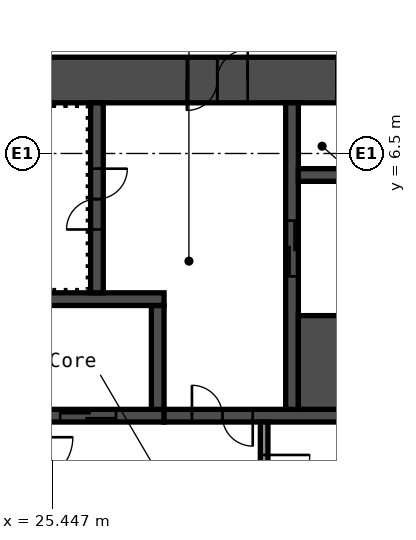
"""IFC4 building model, lengths in metres.
Left out: names, types, materials, properties, quantities, classifications, styles, units other than length and angle.
Written with IfcOpenShell. Run it as: python <this file> out.ifc"""

import sys

from ifc_helpers import new_model, si_unit, direction, frame, frame_2d, origin, place, context, subcontext, project, spatial, rectangle, extrude, element, fill, save


model = new_model("IFC4")
c1 = context("Model", 3, precision=1e-05, world=origin(), true_north=direction((0.0, 1.0)))
c2 = subcontext(c1, "Body", "Model", "MODEL_VIEW")
j1 = project(units=[si_unit("LENGTHUNIT", "METRE"), si_unit("PLANEANGLEUNIT", "RADIAN")], contexts=[c1])
p1 = place(None, origin())
s1 = spatial("IfcSite", under=j1, at=p1, CompositionType="ELEMENT")
p2 = place(p1, origin())
s2 = spatial("IfcBuilding", under=s1, at=p2, CompositionType="ELEMENT")
p3 = place(p2, frame((0.0, 0.0, 69.0)))
s3 = spatial("IfcBuildingStorey", under=s2, at=p3, CompositionType="ELEMENT", Elevation=69.0)
p4 = place(p3, frame((17.7, 7.95, 0.0), z_axis=(0.0, 0.0, 1.0), x_axis=(1.0, 0.0, 0.0)))
e1 = element("IfcWall", 1, at=p4, inside=s3, PredefinedType="SHEAR", context=c2, shape_type="SweptSolid", body=[
    extrude(rectangle(XDim=15.0, YDim=0.9, at=frame_2d((7.5, 0.0))), origin(), (0.0, 0.0, 1.0), 6.0),
])
p5 = place(p4, frame((10.4, 0.0, 0.0)))
e2 = element("IfcOpeningElement", 2, at=p5, cuts=e1, PredefinedType="OPENING", context=c2, shape_type="SweptSolid", body=[
    extrude(rectangle(XDim=1.2, YDim=2.1, at=frame_2d((0.6, 1.05))), frame((0.0, 0.46, 0.0), z_axis=(0.0, -1.0, 0.0), x_axis=(1.0, 0.0, 0.0)), (0.0, 0.0, 1.0), 0.92),
])
p6 = place(p4, frame((13.35, 0.0, 0.0)))
e3 = element("IfcOpeningElement", 3, at=p6, cuts=e1, PredefinedType="OPENING", context=c2, shape_type="SweptSolid", body=[
    extrude(rectangle(XDim=0.9, YDim=2.1, at=frame_2d((0.45, 1.05))), frame((0.0, 0.46, 0.0), z_axis=(0.0, -1.0, 0.0), x_axis=(1.0, 0.0, 0.0)), (0.0, 0.0, 1.0), 0.92),
])
p7 = place(p3, frame((20.15, 1.325, 0.0), z_axis=(0.0, 0.0, 1.0), x_axis=(1.0, 0.0, 0.0)))
e4 = element("IfcWall", 4, at=p7, inside=s3, PredefinedType="SHEAR", context=c2, shape_type="SweptSolid", body=[
    extrude(rectangle(XDim=7.5, YDim=0.25, at=frame_2d((3.75, 0.0))), origin(), (0.0, 0.0, 1.0), 6.0),
])
p8 = place(p7, frame((0.65, 0.0, 0.0)))
e5 = element("IfcOpeningElement", 5, at=p8, cuts=e4, PredefinedType="OPENING", context=c2, shape_type="SweptSolid", body=[
    extrude(rectangle(XDim=1.1, YDim=2.1, at=frame_2d((0.55, 1.05))), frame((0.0, 0.135, 0.0), z_axis=(0.0, -1.0, 0.0), x_axis=(1.0, 0.0, 0.0)), (0.0, 0.0, 1.0), 0.27),
])
p9 = place(p7, frame((3.05, 0.0, 0.0)))
e6 = element("IfcOpeningElement", 6, at=p9, cuts=e4, PredefinedType="OPENING", context=c2, shape_type="SweptSolid", body=[
    extrude(rectangle(XDim=1.1, YDim=2.1, at=frame_2d((0.55, 1.05))), frame((0.0, 0.135, 0.0), z_axis=(0.0, -1.0, 0.0), x_axis=(1.0, 0.0, 0.0)), (0.0, 0.0, 1.0), 0.27),
])
p10 = place(p7, frame((5.45, 0.0, 0.0)))
e7 = element("IfcOpeningElement", 7, at=p10, cuts=e4, PredefinedType="OPENING", context=c2, shape_type="SweptSolid", body=[
    extrude(rectangle(XDim=1.1, YDim=2.1, at=frame_2d((0.55, 1.05))), frame((0.0, 0.135, 0.0), z_axis=(0.0, -1.0, 0.0), x_axis=(1.0, 0.0, 0.0)), (0.0, 0.0, 1.0), 0.27),
])
p11 = place(p3, frame((27.525, 1.45, 0.0), z_axis=(0.0, 0.0, 1.0), x_axis=(0.0, 1.0, 0.0)))
e8 = element("IfcWall", 8, at=p11, inside=s3, PredefinedType="SHEAR", context=c2, shape_type="SweptSolid", body=[
    extrude(rectangle(XDim=2.05, YDim=0.25, at=frame_2d((1.025, 0.0))), origin(), (0.0, 0.0, 1.0), 6.0),
])
p12 = place(p3, frame((20.15, 3.625, 0.0), z_axis=(0.0, 0.0, 1.0), x_axis=(1.0, 0.0, 0.0)))
e9 = element("IfcWall", 9, at=p12, inside=s3, PredefinedType="SHEAR", context=c2, shape_type="SweptSolid", body=[
    extrude(rectangle(XDim=7.5, YDim=0.25, at=frame_2d((3.75, 0.0))), origin(), (0.0, 0.0, 1.0), 6.0),
])
p13 = place(p3, frame((26.325, 3.75, 0.0), z_axis=(0.0, 0.0, 1.0), x_axis=(0.0, 1.0, 0.0)))
e10 = element("IfcWall", 10, at=p13, inside=s3, PredefinedType="SHEAR", context=c2, shape_type="SweptSolid", body=[
    extrude(rectangle(XDim=3.75, YDim=0.25, at=frame_2d((1.875, 0.0))), origin(), (0.0, 0.0, 1.0), 6.0),
])
p14 = place(p13, frame((1.25, 0.0, 0.0)))
e11 = element("IfcOpeningElement", 11, at=p14, cuts=e10, PredefinedType="OPENING", context=c2, shape_type="SweptSolid", body=[
    extrude(rectangle(XDim=1.2, YDim=2.1, at=frame_2d((0.6, 1.05))), frame((0.0, 0.135, 0.0), z_axis=(0.0, -1.0, 0.0), x_axis=(1.0, 0.0, 0.0)), (0.0, 0.0, 1.0), 0.27),
])
p15 = place(p3, frame((27.65, 1.325, 0.0), z_axis=(0.0, 0.0, 1.0), x_axis=(1.0, 0.0, 0.0)))
e12 = element("IfcWall", 12, at=p15, inside=s3, PredefinedType="SHEAR", context=c2, shape_type="SweptSolid", body=[
    extrude(rectangle(XDim=5.05, YDim=0.25, at=frame_2d((2.525, 0.0))), origin(), (0.0, 0.0, 1.0), 6.0),
])
p16 = place(p15, frame((0.55, 0.0, 0.0)))
e13 = element("IfcOpeningElement", 13, at=p16, cuts=e12, PredefinedType="OPENING", context=c2, shape_type="SweptSolid", body=[
    extrude(rectangle(XDim=1.2, YDim=2.1, at=frame_2d((0.6, 1.05))), frame((0.0, 0.135, 0.0), z_axis=(0.0, -1.0, 0.0), x_axis=(1.0, 0.0, 0.0)), (0.0, 0.0, 1.0), 0.27),
])
p17 = place(p3, frame((30.175, 1.45, 0.0), z_axis=(0.0, 0.0, 1.0), x_axis=(0.0, 1.0, 0.0)))
e14 = element("IfcWall", 14, at=p17, inside=s3, PredefinedType="SHEAR", context=c2, shape_type="SweptSolid", body=[
    extrude(rectangle(XDim=6.05, YDim=0.25, at=frame_2d((3.025, 0.0))), origin(), (0.0, 0.0, 1.0), 6.0),
])
p18 = place(p17, frame((2.625, 0.0, 0.0)))
e15 = element("IfcOpeningElement", 15, at=p18, cuts=e14, PredefinedType="OPENING", context=c2, shape_type="SweptSolid", body=[
    extrude(rectangle(XDim=1.1, YDim=2.1, at=frame_2d((0.55, 1.05))), frame((0.0, 0.135, 0.0), z_axis=(0.0, -1.0, 0.0), x_axis=(1.0, 0.0, 0.0)), (0.0, 0.0, 1.0), 0.27),
])
p19 = place(p3, frame((30.3, 2.375, 0.0), z_axis=(0.0, 0.0, 1.0), x_axis=(1.0, 0.0, 0.0)))
e16 = element("IfcWall", 16, at=p19, inside=s3, PredefinedType="SHEAR", context=c2, shape_type="SweptSolid", body=[
    extrude(rectangle(XDim=2.4, YDim=1.85, at=frame_2d((1.2, 0.0))), origin(), (0.0, 0.0, 1.0), 6.0),
])
p20 = place(p3, frame((30.3, 6.075, 0.0), z_axis=(0.0, 0.0, 1.0), x_axis=(1.0, 0.0, 0.0)))
e17 = element("IfcWall", 17, at=p20, inside=s3, PredefinedType="SHEAR", context=c2, shape_type="SweptSolid", body=[
    extrude(rectangle(XDim=2.4, YDim=0.25, at=frame_2d((1.2, 0.0))), origin(), (0.0, 0.0, 1.0), 6.0),
])
p21 = place(p3, frame((29.625, -1.15, 0.0), z_axis=(0.0, 0.0, 1.0), x_axis=(0.0, 1.0, 0.0)))
e18 = element("IfcWall", 18, at=p21, inside=s3, PredefinedType="PARTITIONING", context=c2, shape_type="SweptSolid", body=[
    extrude(rectangle(XDim=2.35, YDim=0.15, at=frame_2d((1.175, 0.0))), origin(), (0.0, 0.0, 1.0), 6.0),
])
p22 = place(p21, frame((0.8, 0.0, 0.0)))
e19 = element("IfcOpeningElement", 19, at=p22, cuts=e18, PredefinedType="OPENING", context=c2, shape_type="SweptSolid", body=[
    extrude(rectangle(XDim=0.9, YDim=2.1, at=frame_2d((0.45, 1.05))), frame((0.0, 0.085, 0.0), z_axis=(0.0, -1.0, 0.0), x_axis=(1.0, 0.0, 0.0)), (0.0, 0.0, 1.0), 0.17),
])
p23 = place(p5, origin())
e20 = element("IfcDoor", 20, at=p23, inside=s3, OperationType="DOUBLE_DOOR_SINGLE_SWING", PredefinedType="DOOR", context=c2, shape_type="SweptSolid", body=[
    extrude(rectangle(XDim=1.2, YDim=2.1, at=frame_2d((0.6, 1.05))), frame((0.0, 0.025, 0.0), z_axis=(0.0, -1.0, 0.0), x_axis=(1.0, 0.0, 0.0)), (0.0, 0.0, 1.0), 0.05),
])
fill(e2, e20)
p24 = place(p14, origin())
e21 = element("IfcDoor", 21, at=p24, inside=s3, OperationType="DOUBLE_DOOR_SINGLE_SWING", PredefinedType="DOOR", context=c2, shape_type="SweptSolid", body=[
    extrude(rectangle(XDim=1.2, YDim=2.1, at=frame_2d((0.6, 1.05))), frame((0.0, 0.025, 0.0), z_axis=(0.0, -1.0, 0.0), x_axis=(1.0, 0.0, 0.0)), (0.0, 0.0, 1.0), 0.05),
])
fill(e11, e21)
p25 = place(p16, origin())
e22 = element("IfcDoor", 22, at=p25, inside=s3, OperationType="DOUBLE_DOOR_SINGLE_SWING", PredefinedType="DOOR", context=c2, shape_type="SweptSolid", body=[
    extrude(rectangle(XDim=1.2, YDim=2.1, at=frame_2d((0.6, 1.05))), frame((0.0, 0.025, 0.0), z_axis=(0.0, -1.0, 0.0), x_axis=(1.0, 0.0, 0.0)), (0.0, 0.0, 1.0), 0.05),
])
fill(e13, e22)
p26 = place(p22, origin())
e23 = element("IfcDoor", 23, at=p26, inside=s3, OperationType="SINGLE_SWING_RIGHT", PredefinedType="DOOR", context=c2, shape_type="SweptSolid", body=[
    extrude(rectangle(XDim=0.9, YDim=2.1, at=frame_2d((0.45, 1.05))), frame((0.0, 0.025, 0.0), z_axis=(0.0, -1.0, 0.0), x_axis=(1.0, 0.0, 0.0)), (0.0, 0.0, 1.0), 0.05),
])
fill(e19, e23)
p27 = place(p10, origin())
e24 = element("IfcDoor", 24, at=p27, inside=s3, OperationType="DOUBLE_DOOR_SLIDING", PredefinedType="DOOR", context=c2, shape_type="SweptSolid", body=[
    extrude(rectangle(XDim=1.1, YDim=2.1, at=frame_2d((0.55, 1.05))), frame((0.0, 0.025, 0.0), z_axis=(0.0, -1.0, 0.0), x_axis=(1.0, 0.0, 0.0)), (0.0, 0.0, 1.0), 0.05),
])
fill(e7, e24)
p28 = place(p18, origin())
e25 = element("IfcDoor", 25, at=p28, inside=s3, OperationType="DOUBLE_DOOR_SLIDING", PredefinedType="DOOR", context=c2, shape_type="SweptSolid", body=[
    extrude(rectangle(XDim=1.1, YDim=2.1, at=frame_2d((0.55, 1.05))), frame((0.0, 0.025, 0.0), z_axis=(0.0, -1.0, 0.0), x_axis=(1.0, 0.0, 0.0)), (0.0, 0.0, 1.0), 0.05),
])
fill(e15, e25)
save(model, sys.argv[1])
